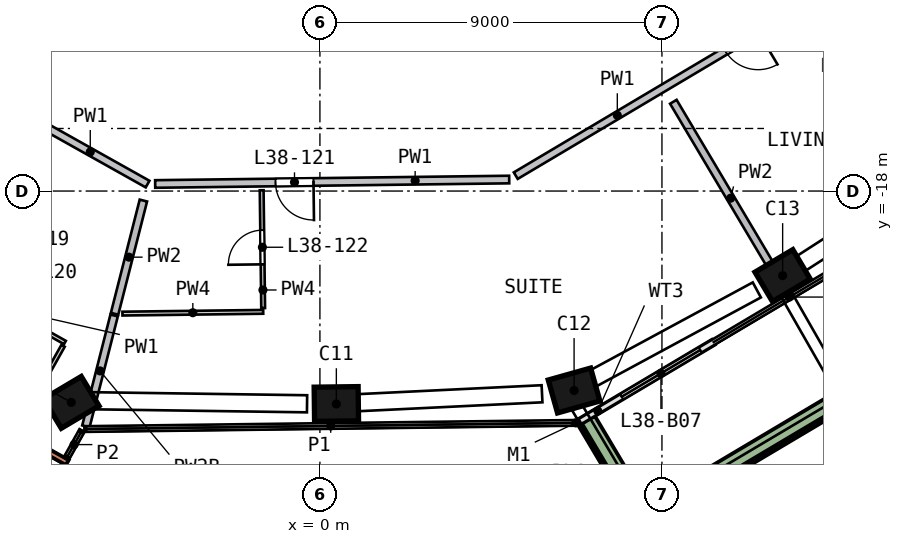
"""IFC4 building model, lengths in metres.
Left out: names, types, materials, properties, quantities, classifications, styles, units other than length and angle.
Written with IfcOpenShell. Run it as: python <this file> out.ifc"""

import sys

from ifc_helpers import new_model, si_unit, direction, frame, frame_2d, origin, origin_2d, place, context, subcontext, project, spatial, rectangle, extrude, element, fill, save


model = new_model("IFC4")
c1 = context("Model", 3, precision=1e-05, world=origin(), true_north=direction((0.0, 1.0)))
c2 = subcontext(c1, "Body", "Model", "MODEL_VIEW")
j1 = project(units=[si_unit("LENGTHUNIT", "METRE"), si_unit("PLANEANGLEUNIT", "RADIAN")], contexts=[c1])
p1 = place(None, origin())
s1 = spatial("IfcSite", under=j1, at=p1, CompositionType="ELEMENT")
p2 = place(p1, origin())
s2 = spatial("IfcBuilding", under=s1, at=p2, CompositionType="ELEMENT")
p3 = place(p2, frame((0.0, 0.0, 158.5)))
s3 = spatial("IfcBuildingStorey", under=s2, at=p3, CompositionType="ELEMENT", Elevation=158.5)
p4 = place(p3, frame((-6.678, -23.524, 0.0), z_axis=(0.112047669, -0.030786503, 0.993225811), x_axis=(-0.853370456, -0.515082556, 0.080304578)))
e1 = element("IfcColumn", 1, at=p4, inside=s3, PredefinedType="COLUMN", context=c2, shape_type="SweptSolid", body=[
    extrude(rectangle(XDim=1.15, YDim=0.9, at=origin_2d()), origin(), (0.0, 0.0, 1.0), 3.212),
])
p5 = place(p3, frame((0.297, -23.606, 0.0), z_axis=(0.112250684, 0.002357569, 0.993677124), x_axis=(0.993599767, 0.012434843, -0.112271448)))
e2 = element("IfcColumn", 2, at=p5, inside=s3, PredefinedType="COLUMN", context=c2, shape_type="SweptSolid", body=[
    extrude(rectangle(XDim=1.15, YDim=0.9, at=origin_2d()), origin(), (0.0, 0.0, 1.0), 3.21),
])
p6 = place(p3, frame((6.555, -23.288, 0.0), z_axis=(0.110466464, 0.032083171, 0.993361883), x_axis=(-0.956261182, -0.26894855, 0.115027077)))
e3 = element("IfcColumn", 3, at=p6, inside=s3, PredefinedType="COLUMN", context=c2, shape_type="SweptSolid", body=[
    extrude(rectangle(XDim=1.15, YDim=0.9, at=origin_2d()), origin(), (0.0, 0.0, 1.0), 3.211),
])
p7 = place(p3, frame((12.06, -20.295, 0.0), z_axis=(0.095976319, 0.058178989, 0.993681917), x_axis=(0.854089929, 0.507873055, -0.11222902)))
e4 = element("IfcColumn", 4, at=p7, inside=s3, PredefinedType="COLUMN", context=c2, shape_type="SweptSolid", body=[
    extrude(rectangle(XDim=1.15, YDim=0.9, at=origin_2d()), origin(), (0.0, 0.0, 1.0), 3.21),
])
p8 = place(p3, frame((-8.282, -24.228, 0.0), z_axis=(0.0, 0.0, 1.0), x_axis=(0.872197236, -0.489154354, 0.0)))
e5 = element("IfcWall", 5, at=p8, inside=s3, PredefinedType="SOLIDWALL", context=c2, shape_type="SweptSolid", body=[
    extrude(rectangle(XDim=1.875, YDim=0.15, at=frame_2d((0.938, 0.0))), origin(), (0.0, 0.0, 1.0), 3.19),
])
p9 = place(p3, frame((6.852, -24.059, 0.0), z_axis=(0.0, 0.0, 1.0), x_axis=(0.859666968, 0.510854875, 0.0)))
e6 = element("IfcWall", 6, at=p9, inside=s3, PredefinedType="SOLIDWALL", context=c2, shape_type="SweptSolid", body=[
    extrude(rectangle(XDim=4.068, YDim=0.15, at=frame_2d((2.034, 0.0))), origin(), (0.0, 0.0, 1.0), 2.475),
])
p10 = place(p9, frame((1.268, 0.0, 0.0)))
e7 = element("IfcOpeningElement", 7, at=p10, cuts=e6, PredefinedType="OPENING", context=c2, shape_type="SweptSolid", body=[
    extrude(rectangle(XDim=2.4, YDim=2.4, at=frame_2d((1.2, 1.2))), frame((0.0, 0.085, 0.0), z_axis=(0.0, -1.0, 0.0), x_axis=(1.0, 0.0, 0.0)), (0.0, 0.0, 1.0), 0.17),
])
p11 = place(p3, frame((7.02, -24.048, 0.0), z_axis=(0.0, 0.0, 1.0), x_axis=(0.510843756, -0.859673576, 0.0)))
e8 = element("IfcWall", 8, at=p11, inside=s3, PredefinedType="SOLIDWALL", context=c2, shape_type="SweptSolid", body=[
    extrude(rectangle(XDim=3.199, YDim=0.5, at=frame_2d((1.6, 0.0))), origin(), (0.0, 0.0, 1.0), 0.7),
])
p12 = place(p3, frame((8.741, -26.455, 0.0), z_axis=(0.0, 0.0, 1.0), x_axis=(0.85967461, 0.510842016, 0.0)))
e9 = element("IfcWall", 9, at=p12, inside=s3, PredefinedType="SOLIDWALL", context=c2, shape_type="SweptSolid", body=[
    extrude(rectangle(XDim=13.224, YDim=0.5, at=frame_2d((6.612, 0.0))), origin(), (0.0, 0.0, 1.0), 0.7),
])
p13 = place(p3, frame((-7.551, -16.125, 0.0), z_axis=(0.0, 0.0, 1.0), x_axis=(0.87222899, -0.489097729, 0.0)))
e10 = element("IfcWall", 10, at=p13, inside=s3, PredefinedType="SOLIDWALL", context=c2, shape_type="SweptSolid", body=[
    extrude(rectangle(XDim=3.458, YDim=0.2, at=frame_2d((1.729, 0.0))), origin(), (0.0, 0.0, 1.0), 3.19),
])
p14 = place(p3, frame((4.981, -17.697, 0.0), z_axis=(0.0, 0.0, 1.0), x_axis=(-0.999920882, -0.01257894, 0.0)))
e11 = element("IfcWall", 11, at=p14, inside=s3, PredefinedType="SOLIDWALL", context=c2, shape_type="SweptSolid", body=[
    extrude(rectangle(XDim=9.316, YDim=0.2, at=frame_2d((4.658, 0.0))), origin(), (0.0, 0.0, 1.0), 3.19),
])
p15 = place(p14, frame((5.15, 0.0, 0.0)))
e12 = element("IfcOpeningElement", 12, at=p15, cuts=e11, PredefinedType="OPENING", context=c2, shape_type="SweptSolid", body=[
    extrude(rectangle(XDim=1.0, YDim=2.1, at=frame_2d((0.5, 1.05))), frame((0.0, 0.11, 0.0), z_axis=(0.0, -1.0, 0.0), x_axis=(1.0, 0.0, 0.0)), (0.0, 0.0, 1.0), 0.22),
])
p16 = place(p3, frame((13.162, -12.836, 0.0), z_axis=(0.0, 0.0, 1.0), x_axis=(-0.859674935, -0.510841468, 0.0)))
e13 = element("IfcWall", 13, at=p16, inside=s3, PredefinedType="SOLIDWALL", context=c2, shape_type="SweptSolid", body=[
    extrude(rectangle(XDim=9.316, YDim=0.2, at=frame_2d((4.658, 0.0))), origin(), (0.0, 0.0, 1.0), 3.19),
])
p17 = place(p16, frame((1.9, 0.0, 0.0)))
e14 = element("IfcOpeningElement", 14, at=p17, cuts=e13, PredefinedType="OPENING", context=c2, shape_type="SweptSolid", body=[
    extrude(rectangle(XDim=1.0, YDim=2.1, at=frame_2d((0.5, 1.05))), frame((0.0, 0.11, 0.0), z_axis=(0.0, -1.0, 0.0), x_axis=(1.0, 0.0, 0.0)), (0.0, 0.0, 1.0), 0.22),
])
p18 = place(p3, frame((-5.415, -21.274, 0.0), z_axis=(0.0, 0.0, 1.0), x_axis=(-0.246711121, -0.969089068, 0.0)))
e15 = element("IfcWall", 15, at=p18, inside=s3, PredefinedType="SOLIDWALL", context=c2, shape_type="SweptSolid", body=[
    extrude(rectangle(XDim=3.011, YDim=0.2, at=frame_2d((1.506, 0.0))), origin(), (0.0, 0.0, 1.0), 2.69),
])
p19 = place(p3, frame((-4.645, -18.25, 0.0), z_axis=(0.0, 0.0, 1.0), x_axis=(-0.246699618, -0.969091997, 0.0)))
e16 = element("IfcWall", 16, at=p19, inside=s3, PredefinedType="SOLIDWALL", context=c2, shape_type="SweptSolid", body=[
    extrude(rectangle(XDim=3.075, YDim=0.2, at=frame_2d((1.537, 0.0))), origin(), (0.0, 0.0, 1.0), 3.19),
])
p20 = place(p3, frame((9.3, -15.651, 0.0), z_axis=(0.0, 0.0, 1.0), x_axis=(0.510811085, -0.859692989, 0.0)))
e17 = element("IfcWall", 17, at=p20, inside=s3, PredefinedType="SOLIDWALL", context=c2, shape_type="SweptSolid", body=[
    extrude(rectangle(XDim=5.903, YDim=0.2, at=frame_2d((2.951, 0.0))), origin(), (0.0, 0.0, 1.0), 3.19),
])
p21 = place(p3, frame((-6.71, -21.986, 0.0), z_axis=(0.0, 0.0, 1.0), x_axis=(-0.872237598, 0.489082379, 0.0)))
e18 = element("IfcWall", 18, at=p21, inside=s3, PredefinedType="PARTITIONING", context=c2, shape_type="SweptSolid", body=[
    extrude(rectangle(XDim=3.6, YDim=0.1, at=frame_2d((1.8, 0.0))), origin(), (0.0, 0.0, 1.0), 3.19),
])
p22 = place(p21, frame((1.4, 0.0, 0.0)))
e19 = element("IfcOpeningElement", 19, at=p22, cuts=e18, PredefinedType="OPENING", context=c2, shape_type="SweptSolid", body=[
    extrude(rectangle(XDim=1.0, YDim=2.1, at=frame_2d((0.5, 1.05))), frame((0.0, 0.06, 0.0), z_axis=(0.0, -1.0, 0.0), x_axis=(1.0, 0.0, 0.0)), (0.0, 0.0, 1.0), 0.12),
])
p23 = place(p3, frame((-6.759, -22.073, 0.0), z_axis=(0.0, 0.0, 1.0), x_axis=(-0.489101779, -0.872226719, 0.0)))
e20 = element("IfcWall", 20, at=p23, inside=s3, PredefinedType="PARTITIONING", context=c2, shape_type="SweptSolid", body=[
    extrude(rectangle(XDim=2.55, YDim=0.1, at=frame_2d((1.275, 0.0))), origin(), (0.0, 0.0, 1.0), 3.19),
])
p24 = place(p3, frame((-1.492, -21.179, 0.0), z_axis=(0.0, 0.0, 1.0), x_axis=(-0.999920758, -0.012588812, 0.0)))
e21 = element("IfcWall", 21, at=p24, inside=s3, PredefinedType="PARTITIONING", context=c2, shape_type="SweptSolid", body=[
    extrude(rectangle(XDim=3.704, YDim=0.1, at=frame_2d((1.852, 0.0))), origin(), (0.0, 0.0, 1.0), 3.19),
])
p25 = place(p3, frame((-1.494, -21.079, 0.0), z_axis=(0.0, 0.0, 1.0), x_axis=(-0.012521661, 0.999921601, 0.0)))
e22 = element("IfcWall", 22, at=p25, inside=s3, PredefinedType="PARTITIONING", context=c2, shape_type="SweptSolid", body=[
    extrude(rectangle(XDim=3.1, YDim=0.1, at=frame_2d((1.55, 0.0))), origin(), (0.0, 0.0, 1.0), 3.19),
])
p26 = place(p25, frame((1.15, 0.0, 0.0)))
e23 = element("IfcOpeningElement", 23, at=p26, cuts=e22, PredefinedType="OPENING", context=c2, shape_type="SweptSolid", body=[
    extrude(rectangle(XDim=0.9, YDim=2.1, at=frame_2d((0.45, 1.05))), frame((0.0, 0.06, 0.0), z_axis=(0.0, -1.0, 0.0), x_axis=(1.0, 0.0, 0.0)), (0.0, 0.0, 1.0), 0.12),
])
p27 = place(p3, frame((13.237, -12.908, 0.0), z_axis=(0.0, 0.0, 1.0), x_axis=(0.71592947, -0.69817261, 0.0)))
e24 = element("IfcWall", 24, at=p27, inside=s3, PredefinedType="PARTITIONING", context=c2, shape_type="SweptSolid", body=[
    extrude(rectangle(XDim=6.476, YDim=0.1, at=frame_2d((3.238, 0.0))), origin(), (0.0, 0.0, 1.0), 2.69),
])
p28 = place(p27, frame((3.55, 0.0, 0.0)))
e25 = element("IfcOpeningElement", 25, at=p28, cuts=e24, PredefinedType="OPENING", context=c2, shape_type="SweptSolid", body=[
    extrude(rectangle(XDim=1.0, YDim=2.1, at=frame_2d((0.5, 1.05))), frame((0.0, 0.06, 0.0), z_axis=(0.0, -1.0, 0.0), x_axis=(1.0, 0.0, 0.0)), (0.0, 0.0, 1.0), 0.12),
])
p29 = place(p10, origin())
e26 = element("IfcDoor", 26, at=p29, inside=s3, OperationType="SLIDING_TO_LEFT", PredefinedType="DOOR", context=c2, shape_type="SweptSolid", body=[
    extrude(rectangle(XDim=2.4, YDim=2.4, at=frame_2d((1.2, 1.2))), frame((0.0, 0.025, 0.0), z_axis=(0.0, -1.0, 0.0), x_axis=(1.0, 0.0, 0.0)), (0.0, 0.0, 1.0), 0.05),
])
fill(e7, e26)
p30 = place(p15, origin())
e27 = element("IfcDoor", 27, at=p30, inside=s3, OperationType="SINGLE_SWING_LEFT", PredefinedType="DOOR", context=c2, shape_type="SweptSolid", body=[
    extrude(rectangle(XDim=1.0, YDim=2.1, at=frame_2d((0.5, 1.05))), frame((0.0, 0.025, 0.0), z_axis=(0.0, -1.0, 0.0), x_axis=(1.0, 0.0, 0.0)), (0.0, 0.0, 1.0), 0.05),
])
fill(e12, e27)
p31 = place(p26, origin())
e28 = element("IfcDoor", 28, at=p31, inside=s3, OperationType="SINGLE_SWING_LEFT", PredefinedType="DOOR", context=c2, shape_type="SweptSolid", body=[
    extrude(rectangle(XDim=0.9, YDim=2.1, at=frame_2d((0.45, 1.05))), frame((0.0, 0.025, 0.0), z_axis=(0.0, -1.0, 0.0), x_axis=(1.0, 0.0, 0.0)), (0.0, 0.0, 1.0), 0.05),
])
fill(e23, e28)
save(model, sys.argv[1])
